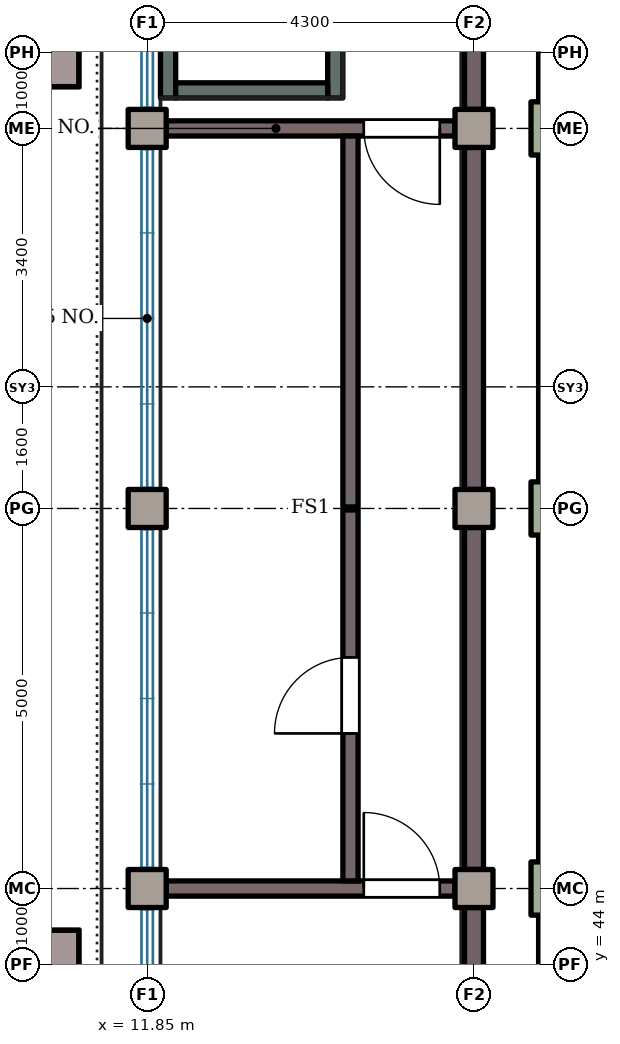
"""IFC4 building model, lengths in metres.
Left out: names, types, materials, properties, quantities, classifications, styles, units other than length and angle.
Written with IfcOpenShell. Run it as: python <this file> out.ifc"""

import sys

from ifc_helpers import new_model, si_unit, direction, frame, frame_2d, origin, origin_2d, place, context, subcontext, project, spatial, rectangle, extrude, element, fill, save


model = new_model("IFC4")
c1 = context("Model", 3, precision=1e-05, world=origin(), true_north=direction((0.0, 1.0)))
c2 = subcontext(c1, "Body", "Model", "MODEL_VIEW")
j1 = project(units=[si_unit("LENGTHUNIT", "METRE"), si_unit("PLANEANGLEUNIT", "RADIAN")], contexts=[c1])
p1 = place(None, origin())
s1 = spatial("IfcSite", under=j1, at=p1, CompositionType="ELEMENT")
p2 = place(p1, origin())
s2 = spatial("IfcBuilding", under=s1, at=p2, CompositionType="ELEMENT")
p3 = place(p2, frame((0.0, 0.0, 4.2)))
s3 = spatial("IfcBuildingStorey", under=s2, at=p3, CompositionType="ELEMENT", Elevation=4.2)
for number, where, z_axis, x_axis in (
    (1, (17.25, 45.0, 0.0), (0.0, 0.0, 1.0), (1.0, 0.0, 0.0)),
    (2, (17.25, 50.0, 0.0), (0.0, 0.0, 1.0), (1.0, 0.0, 0.0)),
    (3, (17.25, 55.0, 0.0), (0.0, 0.0, 1.0), (1.0, 0.0, 0.0)),
):
    element("IfcColumn", number, at=place(p3, frame(where, z_axis=z_axis, x_axis=x_axis)), inside=s3, PredefinedType="COLUMN", context=c2, shape_type="SweptSolid", body=[
        extrude(rectangle(XDim=0.7, YDim=0.7, at=origin_2d()), origin(), (0.0, 0.0, 1.0), 4.2),
    ])
for number, where, z_axis, x_axis in (
    (4, (17.25, 59.649, 0.0), (0.0, 0.0, 1.0), (0.0, -1.0, 0.0)),
    (5, (17.25, 54.649, 0.0), (0.0, 0.0, 1.0), (0.0, -1.0, 0.0)),
    (6, (17.25, 49.649, 0.0), (0.0, 0.0, 1.0), (0.0, -1.0, 0.0)),
    (7, (17.25, 44.649, 0.0), (0.0, 0.0, 1.0), (0.0, -1.0, 0.0)),
):
    element("IfcWall", number, at=place(p3, frame(where, z_axis=z_axis, x_axis=x_axis)), inside=s3, PredefinedType="SHEAR", context=c2, shape_type="SweptSolid", body=[
        extrude(rectangle(XDim=4.299, YDim=0.5, at=frame_2d((2.149, 0.0))), origin(), (0.0, 0.0, 1.0), 3.4),
    ])
for number, where, z_axis, x_axis in (
    (8, (16.15, 55.0, 0.0), (0.0, 0.0, 1.0), (1.0, 0.0, 0.0)),
    (9, (16.15, 50.0, 0.0), (0.0, 0.0, 1.0), (1.0, 0.0, 0.0)),
    (10, (16.15, 45.0, 0.0), (0.0, 0.0, 1.0), (1.0, 0.0, 0.0)),
    (11, (11.85, 55.0, 0.0), (0.0, 0.0, 1.0), (1.0, 0.0, 0.0)),
    (12, (11.85, 50.0, 0.0), (0.0, 0.0, 1.0), (1.0, 0.0, 0.0)),
    (13, (11.85, 45.0, 0.0), (0.0, 0.0, 1.0), (1.0, 0.0, 0.0)),
):
    element("IfcColumn", number, at=place(p3, frame(where, z_axis=z_axis, x_axis=x_axis)), inside=s3, PredefinedType="COLUMN", context=c2, shape_type="SweptSolid", body=[
        extrude(rectangle(XDim=0.5, YDim=0.5, at=origin_2d()), origin(), (0.0, 0.0, 1.0), 4.2),
    ])
for number, where, z_axis, x_axis in (
    (14, (16.15, 59.75, 0.0), (0.0, 0.0, 1.0), (0.0, -1.0, 0.0)),
    (15, (16.15, 54.75, 0.0), (0.0, 0.0, 1.0), (0.0, -1.0, 0.0)),
    (16, (16.15, 49.75, 0.0), (0.0, 0.0, 1.0), (0.0, -1.0, 0.0)),
    (17, (16.15, 44.75, 0.0), (0.0, 0.0, 1.0), (0.0, -1.0, 0.0)),
):
    element("IfcWall", number, at=place(p3, frame(where, z_axis=z_axis, x_axis=x_axis)), inside=s3, PredefinedType="SHEAR", context=c2, shape_type="SweptSolid", body=[
        extrude(rectangle(XDim=4.499, YDim=0.25, at=frame_2d((2.25, 0.0))), origin(), (0.0, 0.0, 1.0), 3.6),
    ])
for number, where, z_axis, x_axis in (
    (18, (10.5, 44.0, 0.0), (0.0, 0.0, 1.0), (1.0, 0.0, 0.0)),
    (19, (10.5, 56.0, 0.0), (0.0, 0.0, 1.0), (1.0, 0.0, 0.0)),
):
    element("IfcColumn", number, at=place(p3, frame(where, z_axis=z_axis, x_axis=x_axis)), inside=s3, PredefinedType="COLUMN", context=c2, shape_type="SweptSolid", body=[
        extrude(rectangle(XDim=0.9, YDim=0.9, at=origin_2d()), origin(), (0.0, 0.0, 1.0), 4.2),
    ])
p4 = place(p3, frame((15.9, 55.0, 0.0), z_axis=(0.0, 0.0, 1.0), x_axis=(-1.0, 0.0, 0.0)))
e20 = element("IfcWall", 20, at=p4, inside=s3, PredefinedType="STANDARD", context=c2, shape_type="SweptSolid", body=[
    extrude(rectangle(XDim=3.8, YDim=0.2, at=frame_2d((1.9, 0.0))), origin(), (0.0, 0.0, 1.0), 3.95),
])
p5 = place(p4, frame((0.2, 0.0, 0.0)))
e21 = element("IfcOpeningElement", 21, at=p5, cuts=e20, PredefinedType="OPENING", context=c2, shape_type="SweptSolid", body=[
    extrude(rectangle(XDim=1.0, YDim=2.1, at=frame_2d((0.5, 1.05))), frame((0.0, 0.11, 0.0), z_axis=(0.0, -1.0, 0.0), x_axis=(1.0, 0.0, 0.0)), (0.0, 0.0, 1.0), 0.22),
])
p6 = place(p3, frame((15.9, 45.0, 0.0), z_axis=(0.0, 0.0, 1.0), x_axis=(-1.0, 0.0, 0.0)))
e22 = element("IfcWall", 22, at=p6, inside=s3, PredefinedType="STANDARD", context=c2, shape_type="SweptSolid", body=[
    extrude(rectangle(XDim=3.8, YDim=0.2, at=frame_2d((1.9, 0.0))), origin(), (0.0, 0.0, 1.0), 3.95),
])
p7 = place(p6, frame((0.2, 0.0, 0.0)))
e23 = element("IfcOpeningElement", 23, at=p7, cuts=e22, PredefinedType="OPENING", context=c2, shape_type="SweptSolid", body=[
    extrude(rectangle(XDim=1.0, YDim=2.1, at=frame_2d((0.5, 1.05))), frame((0.0, 0.11, 0.0), z_axis=(0.0, -1.0, 0.0), x_axis=(1.0, 0.0, 0.0)), (0.0, 0.0, 1.0), 0.22),
])
p8 = place(p3, frame((14.525, 54.899, 0.0), z_axis=(0.0, 0.0, 1.0), x_axis=(0.0, -1.0, 0.0)))
e24 = element("IfcWall", 24, at=p8, inside=s3, PredefinedType="PARTITIONING", context=c2, shape_type="SweptSolid", body=[
    extrude(rectangle(XDim=4.879, YDim=0.2, at=frame_2d((2.44, 0.0))), origin(), (0.0, 0.0, 1.0), 3.95),
])
p9 = place(p3, frame((14.525, 49.98, 0.0), z_axis=(0.0, 0.0, 1.0), x_axis=(0.0, -1.0, 0.0)))
e25 = element("IfcWall", 25, at=p9, inside=s3, PredefinedType="PARTITIONING", context=c2, shape_type="SweptSolid", body=[
    extrude(rectangle(XDim=4.879, YDim=0.2, at=frame_2d((2.44, 0.0))), origin(), (0.0, 0.0, 1.0), 3.95),
])
p10 = place(p9, frame((1.94, 0.0, 0.0)))
e26 = element("IfcOpeningElement", 26, at=p10, cuts=e25, PredefinedType="OPENING", context=c2, shape_type="SweptSolid", body=[
    extrude(rectangle(XDim=1.0, YDim=2.1, at=frame_2d((0.5, 1.05))), frame((0.0, 0.11, 0.0), z_axis=(0.0, -1.0, 0.0), x_axis=(1.0, 0.0, 0.0)), (0.0, 0.0, 1.0), 0.22),
])
p11 = place(p3, frame((14.325, 57.8, 0.0), z_axis=(0.0, 0.0, 1.0), x_axis=(0.0, -1.0, 0.0)))
e27 = element("IfcWall", 27, at=p11, inside=s3, PredefinedType="SHEAR", context=c2, shape_type="SweptSolid", body=[
    extrude(rectangle(XDim=2.4, YDim=0.2, at=frame_2d((1.2, 0.0))), origin(), (0.0, 0.0, 1.0), 4.2),
])
p12 = place(p11, frame((0.7, 0.0, 0.0)))
e28 = element("IfcOpeningElement", 28, at=p12, cuts=e27, PredefinedType="OPENING", context=c2, shape_type="SweptSolid", body=[
    extrude(rectangle(XDim=1.0, YDim=2.1, at=frame_2d((0.5, 1.05))), frame((0.0, 0.11, 0.0), z_axis=(0.0, -1.0, 0.0), x_axis=(1.0, 0.0, 0.0)), (0.0, 0.0, 1.0), 0.22),
])
p13 = place(p3, frame((12.125, 57.8, 0.0), z_axis=(0.0, 0.0, 1.0), x_axis=(0.0, -1.0, 0.0)))
e29 = element("IfcWall", 29, at=p13, inside=s3, PredefinedType="SHEAR", context=c2, shape_type="SweptSolid", body=[
    extrude(rectangle(XDim=2.4, YDim=0.2, at=frame_2d((1.2, 0.0))), origin(), (0.0, 0.0, 1.0), 4.2),
])
p14 = place(p3, frame((14.225, 55.5, 0.0), z_axis=(0.0, 0.0, 1.0), x_axis=(-1.0, 0.0, 0.0)))
e30 = element("IfcWall", 30, at=p14, inside=s3, PredefinedType="SHEAR", context=c2, shape_type="SweptSolid", body=[
    extrude(rectangle(XDim=2.0, YDim=0.2, at=frame_2d((1.0, 0.0))), origin(), (0.0, 0.0, 1.0), 4.2),
])
p15 = place(p5, origin())
e31 = element("IfcDoor", 31, at=p15, inside=s3, OperationType="SINGLE_SWING_LEFT", PredefinedType="DOOR", context=c2, shape_type="SweptSolid", body=[
    extrude(rectangle(XDim=1.0, YDim=2.1, at=frame_2d((0.5, 1.05))), frame((0.0, 0.025, 0.0), z_axis=(0.0, -1.0, 0.0), x_axis=(1.0, 0.0, 0.0)), (0.0, 0.0, 1.0), 0.05),
])
fill(e21, e31)
p16 = place(p7, origin())
e32 = element("IfcDoor", 32, at=p16, inside=s3, OperationType="SINGLE_SWING_RIGHT", PredefinedType="DOOR", context=c2, shape_type="SweptSolid", body=[
    extrude(rectangle(XDim=1.0, YDim=2.1, at=frame_2d((0.5, 1.05))), frame((0.0, 0.025, 0.0), z_axis=(0.0, -1.0, 0.0), x_axis=(1.0, 0.0, 0.0)), (0.0, 0.0, 1.0), 0.05),
])
fill(e23, e32)
p17 = place(p10, origin())
e33 = element("IfcDoor", 33, at=p17, inside=s3, OperationType="SINGLE_SWING_RIGHT", PredefinedType="DOOR", context=c2, shape_type="SweptSolid", body=[
    extrude(rectangle(XDim=1.0, YDim=2.1, at=frame_2d((0.5, 1.05))), frame((0.0, 0.025, 0.0), z_axis=(0.0, -1.0, 0.0), x_axis=(1.0, 0.0, 0.0)), (0.0, 0.0, 1.0), 0.05),
])
fill(e26, e33)
save(model, sys.argv[1])
